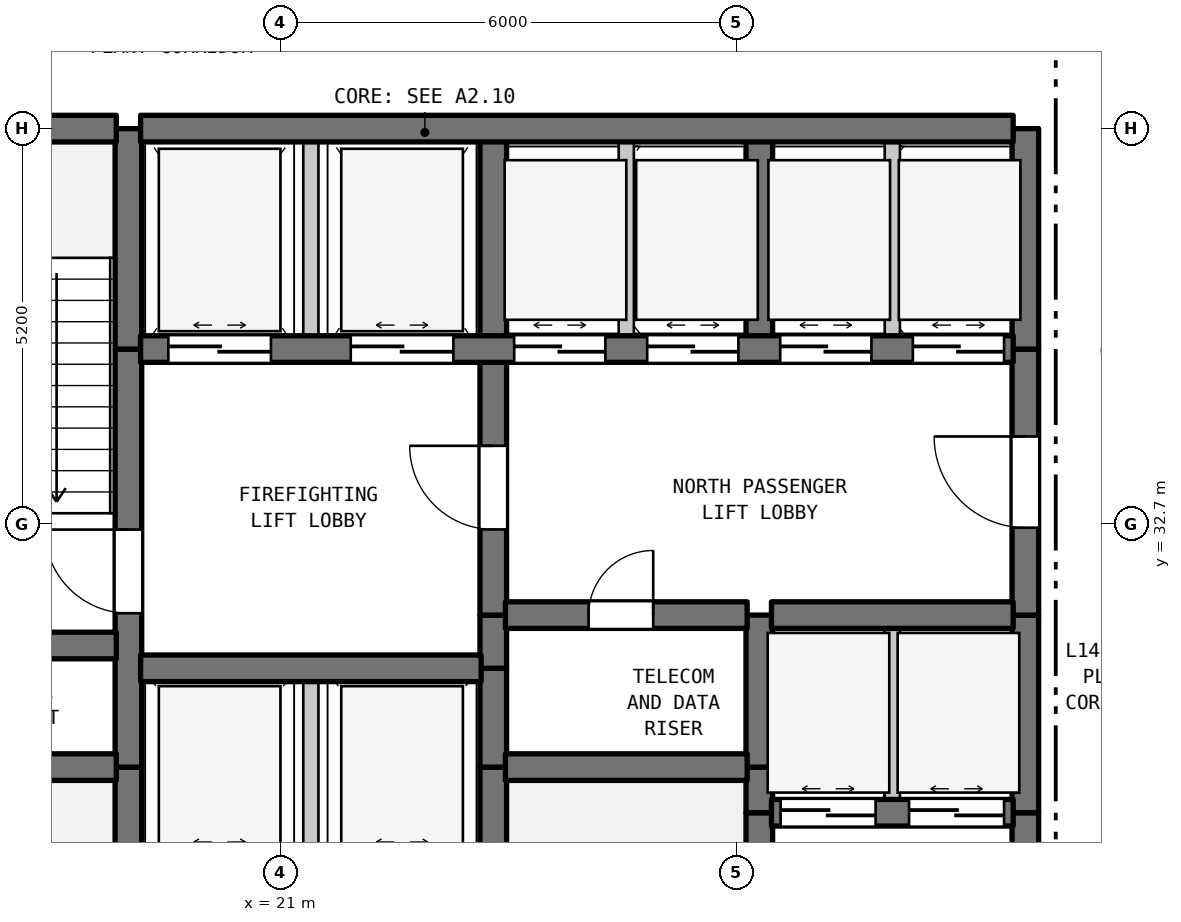
"""IFC4 building model, lengths in metres.
Left out: names, types, materials, properties, quantities, classifications, styles, units other than length and angle.
Written with IfcOpenShell. Run it as: python <this file> out.ifc"""

import sys

from ifc_helpers import new_model, si_unit, direction, frame, frame_2d, origin, place, context, subcontext, project, spatial, rectangle, extrude, element, fill, save


model = new_model("IFC4")
c1 = context("Model", 3, precision=1e-05, world=origin(), true_north=direction((0.0, 1.0)))
c2 = subcontext(c1, "Body", "Model", "MODEL_VIEW")
j1 = project(units=[si_unit("LENGTHUNIT", "METRE"), si_unit("PLANEANGLEUNIT", "RADIAN")], contexts=[c1])
p1 = place(None, origin())
s1 = spatial("IfcSite", under=j1, at=p1, CompositionType="ELEMENT")
p2 = place(p1, origin())
s2 = spatial("IfcBuilding", under=s1, at=p2, CompositionType="ELEMENT")
p3 = place(p2, frame((0.0, 0.0, 61.0)))
s3 = spatial("IfcBuildingStorey", under=s2, at=p3, CompositionType="ELEMENT", Elevation=61.0)
p4 = place(p3, frame((19.0, 28.2, 0.0), z_axis=(0.0, 0.0, 1.0), x_axis=(0.0, 1.0, 0.0)))
e1 = element("IfcWall", 1, at=p4, inside=s3, PredefinedType="SHEAR", context=c2, shape_type="SweptSolid", body=[
    extrude(rectangle(XDim=1.3, YDim=0.35, at=frame_2d((0.65, 0.0))), origin(), (0.0, 0.0, 1.0), 4.28),
])
p5 = place(p3, frame((19.0, 29.5, 0.0), z_axis=(0.0, 0.0, 1.0), x_axis=(0.0, 1.0, 0.0)))
e2 = element("IfcWall", 2, at=p5, inside=s3, PredefinedType="SHEAR", context=c2, shape_type="SweptSolid", body=[
    extrude(rectangle(XDim=5.5, YDim=0.35, at=frame_2d((2.75, 0.0))), origin(), (0.0, 0.0, 1.0), 4.28),
])
p6 = place(p5, frame((2.025, 0.0, 0.0)))
e3 = element("IfcOpeningElement", 3, at=p6, cuts=e2, PredefinedType="OPENING", context=c2, shape_type="SweptSolid", body=[
    extrude(rectangle(XDim=1.1, YDim=2.15, at=frame_2d((0.55, 1.075))), frame((0.0, 0.185, 0.0), z_axis=(0.0, -1.0, 0.0), x_axis=(1.0, 0.0, 0.0)), (0.0, 0.0, 1.0), 0.37),
])
p7 = place(p3, frame((19.0, 35.0, 0.0), z_axis=(0.0, 0.0, 1.0), x_axis=(0.0, 1.0, 0.0)))
e4 = element("IfcWall", 4, at=p7, inside=s3, PredefinedType="SHEAR", context=c2, shape_type="SweptSolid", body=[
    extrude(rectangle(XDim=2.9, YDim=0.35, at=frame_2d((1.45, 0.0))), origin(), (0.0, 0.0, 1.0), 4.28),
])
p8 = place(p3, frame((21.4, 28.2, 0.0), z_axis=(0.0, 0.0, 1.0), x_axis=(0.0, 1.0, 0.0)))
e5 = element("IfcWall", 5, at=p8, inside=s3, PredefinedType="STANDARD", context=c2, shape_type="SweptSolid", body=[
    extrude(rectangle(XDim=2.6, YDim=0.2, at=frame_2d((1.3, 0.0))), origin(), (0.0, 0.0, 1.0), 4.28),
])
p9 = place(p3, frame((21.4, 35.0, 0.0), z_axis=(0.0, 0.0, 1.0), x_axis=(0.0, 1.0, 0.0)))
e6 = element("IfcWall", 6, at=p9, inside=s3, PredefinedType="STANDARD", context=c2, shape_type="SweptSolid", body=[
    extrude(rectangle(XDim=2.9, YDim=0.2, at=frame_2d((1.45, 0.0))), origin(), (0.0, 0.0, 1.0), 4.28),
])
for number, where, z_axis, x_axis in (
    (7, (23.8, 28.2, 0.0), (0.0, 0.0, 1.0), (0.0, 1.0, 0.0)),
    (8, (23.8, 29.5, 0.0), (0.0, 0.0, 1.0), (0.0, 1.0, 0.0)),
):
    element("IfcWall", number, at=place(p3, frame(where, z_axis=z_axis, x_axis=x_axis)), inside=s3, PredefinedType="SHEAR", context=c2, shape_type="SweptSolid", body=[
        extrude(rectangle(XDim=1.3, YDim=0.35, at=frame_2d((0.65, 0.0))), origin(), (0.0, 0.0, 1.0), 4.28),
    ])
p10 = place(p3, frame((23.8, 30.8, 0.0), z_axis=(0.0, 0.0, 1.0), x_axis=(0.0, 1.0, 0.0)))
e9 = element("IfcWall", 9, at=p10, inside=s3, PredefinedType="SHEAR", context=c2, shape_type="SweptSolid", body=[
    extrude(rectangle(XDim=0.7, YDim=0.35, at=frame_2d((0.35, 0.0))), origin(), (0.0, 0.0, 1.0), 4.28),
])
p11 = place(p3, frame((23.8, 31.5, 0.0), z_axis=(0.0, 0.0, 1.0), x_axis=(0.0, 1.0, 0.0)))
e10 = element("IfcWall", 10, at=p11, inside=s3, PredefinedType="SHEAR", context=c2, shape_type="SweptSolid", body=[
    extrude(rectangle(XDim=3.5, YDim=0.35, at=frame_2d((1.75, 0.0))), origin(), (0.0, 0.0, 1.0), 4.28),
])
p12 = place(p11, frame((1.127, 0.0, 0.0)))
e11 = element("IfcOpeningElement", 11, at=p12, cuts=e10, PredefinedType="OPENING", context=c2, shape_type="SweptSolid", body=[
    extrude(rectangle(XDim=1.1, YDim=2.15, at=frame_2d((0.55, 1.075))), frame((0.0, 0.185, 0.0), z_axis=(0.0, -1.0, 0.0), x_axis=(1.0, 0.0, 0.0)), (0.0, 0.0, 1.0), 0.37),
])
p13 = place(p3, frame((23.8, 35.0, 0.0), z_axis=(0.0, 0.0, 1.0), x_axis=(0.0, 1.0, 0.0)))
e12 = element("IfcWall", 12, at=p13, inside=s3, PredefinedType="SHEAR", context=c2, shape_type="SweptSolid", body=[
    extrude(rectangle(XDim=2.9, YDim=0.35, at=frame_2d((1.45, 0.0))), origin(), (0.0, 0.0, 1.0), 4.28),
])
p14 = place(p3, frame((25.55, 35.0, 0.0), z_axis=(0.0, 0.0, 1.0), x_axis=(0.0, 1.0, 0.0)))
e13 = element("IfcWall", 13, at=p14, inside=s3, PredefinedType="STANDARD", context=c2, shape_type="SweptSolid", body=[
    extrude(rectangle(XDim=2.9, YDim=0.2, at=frame_2d((1.45, 0.0))), origin(), (0.0, 0.0, 1.0), 4.28),
])
p15 = place(p3, frame((27.3, 25.6, 0.0), z_axis=(0.0, 0.0, 1.0), x_axis=(0.0, 1.0, 0.0)))
e14 = element("IfcWall", 14, at=p15, inside=s3, PredefinedType="SHEAR", context=c2, shape_type="SweptSolid", body=[
    extrude(rectangle(XDim=3.3, YDim=0.35, at=frame_2d((1.65, 0.0))), origin(), (0.0, 0.0, 1.0), 4.28),
])
p16 = place(p3, frame((27.3, 28.9, 0.0), z_axis=(0.0, 0.0, 1.0), x_axis=(0.0, 1.0, 0.0)))
e15 = element("IfcWall", 15, at=p16, inside=s3, PredefinedType="SHEAR", context=c2, shape_type="SweptSolid", body=[
    extrude(rectangle(XDim=0.6, YDim=0.35, at=frame_2d((0.3, 0.0))), origin(), (0.0, 0.0, 1.0), 4.28),
])
p17 = place(p3, frame((27.3, 29.5, 0.0), z_axis=(0.0, 0.0, 1.0), x_axis=(0.0, 1.0, 0.0)))
e16 = element("IfcWall", 16, at=p17, inside=s3, PredefinedType="SHEAR", context=c2, shape_type="SweptSolid", body=[
    extrude(rectangle(XDim=2.0, YDim=0.35, at=frame_2d((1.0, 0.0))), origin(), (0.0, 0.0, 1.0), 4.28),
])
p18 = place(p3, frame((27.3, 35.0, 0.0), z_axis=(0.0, 0.0, 1.0), x_axis=(0.0, 1.0, 0.0)))
e17 = element("IfcWall", 17, at=p18, inside=s3, PredefinedType="SHEAR", context=c2, shape_type="SweptSolid", body=[
    extrude(rectangle(XDim=2.9, YDim=0.35, at=frame_2d((1.45, 0.0))), origin(), (0.0, 0.0, 1.0), 4.28),
])
p19 = place(p3, frame((29.05, 28.9, 0.0), z_axis=(0.0, 0.0, 1.0), x_axis=(0.0, 1.0, 0.0)))
e18 = element("IfcWall", 18, at=p19, inside=s3, PredefinedType="STANDARD", context=c2, shape_type="SweptSolid", body=[
    extrude(rectangle(XDim=2.6, YDim=0.2, at=frame_2d((1.3, 0.0))), origin(), (0.0, 0.0, 1.0), 4.28),
])
p20 = place(p3, frame((29.05, 35.0, 0.0), z_axis=(0.0, 0.0, 1.0), x_axis=(0.0, 1.0, 0.0)))
e19 = element("IfcWall", 19, at=p20, inside=s3, PredefinedType="STANDARD", context=c2, shape_type="SweptSolid", body=[
    extrude(rectangle(XDim=2.9, YDim=0.2, at=frame_2d((1.45, 0.0))), origin(), (0.0, 0.0, 1.0), 4.28),
])
p21 = place(p3, frame((30.8, 25.6, 0.0), z_axis=(0.0, 0.0, 1.0), x_axis=(0.0, 1.0, 0.0)))
e20 = element("IfcWall", 20, at=p21, inside=s3, PredefinedType="SHEAR", context=c2, shape_type="SweptSolid", body=[
    extrude(rectangle(XDim=3.3, YDim=0.35, at=frame_2d((1.65, 0.0))), origin(), (0.0, 0.0, 1.0), 4.28),
])
p22 = place(p21, frame((0.253, 0.0, 0.0)))
e21 = element("IfcOpeningElement", 21, at=p22, cuts=e20, PredefinedType="OPENING", context=c2, shape_type="SweptSolid", body=[
    extrude(rectangle(XDim=1.2, YDim=2.2, at=frame_2d((0.6, 1.1))), frame((0.0, 0.185, 0.0), z_axis=(0.0, -1.0, 0.0), x_axis=(1.0, 0.0, 0.0)), (0.0, 0.0, 1.0), 0.37),
])
p23 = place(p3, frame((30.8, 28.9, 0.0), z_axis=(0.0, 0.0, 1.0), x_axis=(0.0, 1.0, 0.0)))
e22 = element("IfcWall", 22, at=p23, inside=s3, PredefinedType="SHEAR", context=c2, shape_type="SweptSolid", body=[
    extrude(rectangle(XDim=2.6, YDim=0.35, at=frame_2d((1.3, 0.0))), origin(), (0.0, 0.0, 1.0), 4.28),
])
p24 = place(p3, frame((30.8, 31.5, 0.0), z_axis=(0.0, 0.0, 1.0), x_axis=(0.0, 1.0, 0.0)))
e23 = element("IfcWall", 23, at=p24, inside=s3, PredefinedType="SHEAR", context=c2, shape_type="SweptSolid", body=[
    extrude(rectangle(XDim=3.5, YDim=0.35, at=frame_2d((1.75, 0.0))), origin(), (0.0, 0.0, 1.0), 4.28),
])
p25 = place(p24, frame((1.15, 0.0, 0.0)))
e24 = element("IfcOpeningElement", 24, at=p25, cuts=e23, PredefinedType="OPENING", context=c2, shape_type="SweptSolid", body=[
    extrude(rectangle(XDim=1.2, YDim=2.2, at=frame_2d((0.6, 1.1))), frame((0.0, 0.185, 0.0), z_axis=(0.0, -1.0, 0.0), x_axis=(1.0, 0.0, 0.0)), (0.0, 0.0, 1.0), 0.37),
])
p26 = place(p3, frame((30.8, 35.0, 0.0), z_axis=(0.0, 0.0, 1.0), x_axis=(0.0, 1.0, 0.0)))
e25 = element("IfcWall", 25, at=p26, inside=s3, PredefinedType="SHEAR", context=c2, shape_type="SweptSolid", body=[
    extrude(rectangle(XDim=2.9, YDim=0.35, at=frame_2d((1.45, 0.0))), origin(), (0.0, 0.0, 1.0), 4.28),
])
p27 = place(p3, frame((27.46, 28.9, 0.0), z_axis=(0.0, 0.0, 1.0), x_axis=(1.0, 0.0, 0.0)))
e26 = element("IfcWall", 26, at=p27, inside=s3, PredefinedType="SHEAR", context=c2, shape_type="SweptSolid", body=[
    extrude(rectangle(XDim=3.18, YDim=0.35, at=frame_2d((1.59, 0.0))), origin(), (0.0, 0.0, 1.0), 4.28),
])
p28 = place(p27, frame((0.12, 0.0, 0.0)))
e27 = element("IfcOpeningElement", 27, at=p28, cuts=e26, PredefinedType="OPENING", context=c2, shape_type="SweptSolid", body=[
    extrude(rectangle(XDim=1.25, YDim=2.2, at=frame_2d((0.625, 1.1))), frame((0.0, 0.185, 0.0), z_axis=(0.0, -1.0, 0.0), x_axis=(1.0, 0.0, 0.0)), (0.0, 0.0, 1.0), 0.37),
])
p29 = place(p27, frame((1.81, 0.0, 0.0)))
e28 = element("IfcOpeningElement", 28, at=p29, cuts=e26, PredefinedType="OPENING", context=c2, shape_type="SweptSolid", body=[
    extrude(rectangle(XDim=1.25, YDim=2.2, at=frame_2d((0.625, 1.1))), frame((0.0, 0.185, 0.0), z_axis=(0.0, -1.0, 0.0), x_axis=(1.0, 0.0, 0.0)), (0.0, 0.0, 1.0), 0.37),
])
p30 = place(p3, frame((15.16, 29.5, 0.0), z_axis=(0.0, 0.0, 1.0), x_axis=(1.0, 0.0, 0.0)))
e29 = element("IfcWall", 29, at=p30, inside=s3, PredefinedType="SHEAR", context=c2, shape_type="SweptSolid", body=[
    extrude(rectangle(XDim=3.68, YDim=0.35, at=frame_2d((1.84, 0.0))), origin(), (0.0, 0.0, 1.0), 4.28),
])
p31 = place(p3, frame((23.96, 29.5, 0.0), z_axis=(0.0, 0.0, 1.0), x_axis=(1.0, 0.0, 0.0)))
e30 = element("IfcWall", 30, at=p31, inside=s3, PredefinedType="SHEAR", context=c2, shape_type="SweptSolid", body=[
    extrude(rectangle(XDim=3.18, YDim=0.35, at=frame_2d((1.59, 0.0))), origin(), (0.0, 0.0, 1.0), 4.28),
])
p32 = place(p3, frame((19.16, 30.8, 0.0), z_axis=(0.0, 0.0, 1.0), x_axis=(1.0, 0.0, 0.0)))
e31 = element("IfcWall", 31, at=p32, inside=s3, PredefinedType="SHEAR", context=c2, shape_type="SweptSolid", body=[
    extrude(rectangle(XDim=4.48, YDim=0.35, at=frame_2d((2.24, 0.0))), origin(), (0.0, 0.0, 1.0), 4.28),
])
p33 = place(p3, frame((15.16, 31.1, 0.0), z_axis=(0.0, 0.0, 1.0), x_axis=(1.0, 0.0, 0.0)))
e32 = element("IfcWall", 32, at=p33, inside=s3, PredefinedType="SHEAR", context=c2, shape_type="SweptSolid", body=[
    extrude(rectangle(XDim=3.68, YDim=0.35, at=frame_2d((1.84, 0.0))), origin(), (0.0, 0.0, 1.0), 4.28),
])
p34 = place(p3, frame((23.96, 31.5, 0.0), z_axis=(0.0, 0.0, 1.0), x_axis=(1.0, 0.0, 0.0)))
e33 = element("IfcWall", 33, at=p34, inside=s3, PredefinedType="SHEAR", context=c2, shape_type="SweptSolid", body=[
    extrude(rectangle(XDim=3.18, YDim=0.35, at=frame_2d((1.59, 0.0))), origin(), (0.0, 0.0, 1.0), 4.28),
])
p35 = place(p34, frame((1.094, 0.0, 0.0)))
e34 = element("IfcOpeningElement", 34, at=p35, cuts=e33, PredefinedType="OPENING", context=c2, shape_type="SweptSolid", body=[
    extrude(rectangle(XDim=0.85, YDim=2.1, at=frame_2d((0.425, 1.05))), frame((0.0, 0.185, 0.0), z_axis=(0.0, -1.0, 0.0), x_axis=(1.0, 0.0, 0.0)), (0.0, 0.0, 1.0), 0.37),
])
p36 = place(p3, frame((27.46, 31.5, 0.0), z_axis=(0.0, 0.0, 1.0), x_axis=(1.0, 0.0, 0.0)))
e35 = element("IfcWall", 35, at=p36, inside=s3, PredefinedType="SHEAR", context=c2, shape_type="SweptSolid", body=[
    extrude(rectangle(XDim=3.18, YDim=0.35, at=frame_2d((1.59, 0.0))), origin(), (0.0, 0.0, 1.0), 4.28),
])
p37 = place(p3, frame((19.16, 35.0, 0.0), z_axis=(0.0, 0.0, 1.0), x_axis=(1.0, 0.0, 0.0)))
e36 = element("IfcWall", 36, at=p37, inside=s3, PredefinedType="SHEAR", context=c2, shape_type="SweptSolid", body=[
    extrude(rectangle(XDim=11.48, YDim=0.35, at=frame_2d((5.74, 0.0))), origin(), (0.0, 0.0, 1.0), 4.28),
])
p38 = place(p37, frame((0.365, 0.0, 0.0)))
e37 = element("IfcOpeningElement", 37, at=p38, cuts=e36, PredefinedType="OPENING", context=c2, shape_type="SweptSolid", body=[
    extrude(rectangle(XDim=1.35, YDim=2.2, at=frame_2d((0.675, 1.1))), frame((0.0, 0.185, 0.0), z_axis=(0.0, -1.0, 0.0), x_axis=(1.0, 0.0, 0.0)), (0.0, 0.0, 1.0), 0.37),
])
p39 = place(p37, frame((2.765, 0.0, 0.0)))
e38 = element("IfcOpeningElement", 38, at=p39, cuts=e36, PredefinedType="OPENING", context=c2, shape_type="SweptSolid", body=[
    extrude(rectangle(XDim=1.35, YDim=2.2, at=frame_2d((0.675, 1.1))), frame((0.0, 0.185, 0.0), z_axis=(0.0, -1.0, 0.0), x_axis=(1.0, 0.0, 0.0)), (0.0, 0.0, 1.0), 0.37),
])
p40 = place(p37, frame((4.915, 0.0, 0.0)))
e39 = element("IfcOpeningElement", 39, at=p40, cuts=e36, PredefinedType="OPENING", context=c2, shape_type="SweptSolid", body=[
    extrude(rectangle(XDim=1.2, YDim=2.2, at=frame_2d((0.6, 1.1))), frame((0.0, 0.185, 0.0), z_axis=(0.0, -1.0, 0.0), x_axis=(1.0, 0.0, 0.0)), (0.0, 0.0, 1.0), 0.37),
])
p41 = place(p37, frame((6.665, 0.0, 0.0)))
e40 = element("IfcOpeningElement", 40, at=p41, cuts=e36, PredefinedType="OPENING", context=c2, shape_type="SweptSolid", body=[
    extrude(rectangle(XDim=1.2, YDim=2.2, at=frame_2d((0.6, 1.1))), frame((0.0, 0.185, 0.0), z_axis=(0.0, -1.0, 0.0), x_axis=(1.0, 0.0, 0.0)), (0.0, 0.0, 1.0), 0.37),
])
p42 = place(p37, frame((8.415, 0.0, 0.0)))
e41 = element("IfcOpeningElement", 41, at=p42, cuts=e36, PredefinedType="OPENING", context=c2, shape_type="SweptSolid", body=[
    extrude(rectangle(XDim=1.2, YDim=2.2, at=frame_2d((0.6, 1.1))), frame((0.0, 0.185, 0.0), z_axis=(0.0, -1.0, 0.0), x_axis=(1.0, 0.0, 0.0)), (0.0, 0.0, 1.0), 0.37),
])
p43 = place(p37, frame((10.16, 0.0, 0.0)))
e42 = element("IfcOpeningElement", 42, at=p43, cuts=e36, PredefinedType="OPENING", context=c2, shape_type="SweptSolid", body=[
    extrude(rectangle(XDim=1.2, YDim=2.2, at=frame_2d((0.6, 1.1))), frame((0.0, 0.185, 0.0), z_axis=(0.0, -1.0, 0.0), x_axis=(1.0, 0.0, 0.0)), (0.0, 0.0, 1.0), 0.37),
])
p44 = place(p3, frame((15.16, 37.9, 0.0), z_axis=(0.0, 0.0, 1.0), x_axis=(1.0, 0.0, 0.0)))
e43 = element("IfcWall", 43, at=p44, inside=s3, PredefinedType="SHEAR", context=c2, shape_type="SweptSolid", body=[
    extrude(rectangle(XDim=3.68, YDim=0.35, at=frame_2d((1.84, 0.0))), origin(), (0.0, 0.0, 1.0), 4.28),
])
p45 = place(p3, frame((19.16, 37.9, 0.0), z_axis=(0.0, 0.0, 1.0), x_axis=(1.0, 0.0, 0.0)))
e44 = element("IfcWall", 44, at=p45, inside=s3, PredefinedType="SHEAR", context=c2, shape_type="SweptSolid", body=[
    extrude(rectangle(XDim=11.48, YDim=0.35, at=frame_2d((5.74, 0.0))), origin(), (0.0, 0.0, 1.0), 4.28),
])
p46 = place(p6, origin())
e45 = element("IfcDoor", 45, at=p46, inside=s3, OperationType="SINGLE_SWING_RIGHT", PredefinedType="DOOR", context=c2, shape_type="SweptSolid", body=[
    extrude(rectangle(XDim=1.1, YDim=2.15, at=frame_2d((0.55, 1.075))), frame((0.0, 0.025, 0.0), z_axis=(0.0, -1.0, 0.0), x_axis=(1.0, 0.0, 0.0)), (0.0, 0.0, 1.0), 0.05),
])
fill(e3, e45)
p47 = place(p12, origin())
e46 = element("IfcDoor", 46, at=p47, inside=s3, OperationType="SINGLE_SWING_RIGHT", PredefinedType="DOOR", context=c2, shape_type="SweptSolid", body=[
    extrude(rectangle(XDim=1.1, YDim=2.15, at=frame_2d((0.55, 1.075))), frame((0.0, 0.025, 0.0), z_axis=(0.0, -1.0, 0.0), x_axis=(1.0, 0.0, 0.0)), (0.0, 0.0, 1.0), 0.05),
])
fill(e11, e46)
p48 = place(p25, origin())
e47 = element("IfcDoor", 47, at=p48, inside=s3, OperationType="SINGLE_SWING_RIGHT", PredefinedType="DOOR", context=c2, shape_type="SweptSolid", body=[
    extrude(rectangle(XDim=1.2, YDim=2.2, at=frame_2d((0.6, 1.1))), frame((0.0, 0.025, 0.0), z_axis=(0.0, -1.0, 0.0), x_axis=(1.0, 0.0, 0.0)), (0.0, 0.0, 1.0), 0.05),
])
fill(e24, e47)
p49 = place(p28, origin())
e48 = element("IfcDoor", 48, at=p49, inside=s3, OperationType="DOUBLE_DOOR_SLIDING", PredefinedType="DOOR", context=c2, shape_type="SweptSolid", body=[
    extrude(rectangle(XDim=1.25, YDim=2.2, at=frame_2d((0.625, 1.1))), frame((0.0, 0.025, 0.0), z_axis=(0.0, -1.0, 0.0), x_axis=(1.0, 0.0, 0.0)), (0.0, 0.0, 1.0), 0.05),
])
fill(e27, e48)
p50 = place(p29, origin())
e49 = element("IfcDoor", 49, at=p50, inside=s3, OperationType="DOUBLE_DOOR_SLIDING", PredefinedType="DOOR", context=c2, shape_type="SweptSolid", body=[
    extrude(rectangle(XDim=1.25, YDim=2.2, at=frame_2d((0.625, 1.1))), frame((0.0, 0.025, 0.0), z_axis=(0.0, -1.0, 0.0), x_axis=(1.0, 0.0, 0.0)), (0.0, 0.0, 1.0), 0.05),
])
fill(e28, e49)
p51 = place(p35, origin())
e50 = element("IfcDoor", 50, at=p51, inside=s3, OperationType="SINGLE_SWING_RIGHT", PredefinedType="DOOR", context=c2, shape_type="SweptSolid", body=[
    extrude(rectangle(XDim=0.85, YDim=2.1, at=frame_2d((0.425, 1.05))), frame((0.0, 0.025, 0.0), z_axis=(0.0, -1.0, 0.0), x_axis=(1.0, 0.0, 0.0)), (0.0, 0.0, 1.0), 0.05),
])
fill(e34, e50)
p52 = place(p38, origin())
e51 = element("IfcDoor", 51, at=p52, inside=s3, OperationType="DOUBLE_DOOR_SLIDING", PredefinedType="DOOR", context=c2, shape_type="SweptSolid", body=[
    extrude(rectangle(XDim=1.35, YDim=2.2, at=frame_2d((0.675, 1.1))), frame((0.0, 0.025, 0.0), z_axis=(0.0, -1.0, 0.0), x_axis=(1.0, 0.0, 0.0)), (0.0, 0.0, 1.0), 0.05),
])
fill(e37, e51)
p53 = place(p39, origin())
e52 = element("IfcDoor", 52, at=p53, inside=s3, OperationType="DOUBLE_DOOR_SLIDING", PredefinedType="DOOR", context=c2, shape_type="SweptSolid", body=[
    extrude(rectangle(XDim=1.35, YDim=2.2, at=frame_2d((0.675, 1.1))), frame((0.0, 0.025, 0.0), z_axis=(0.0, -1.0, 0.0), x_axis=(1.0, 0.0, 0.0)), (0.0, 0.0, 1.0), 0.05),
])
fill(e38, e52)
p54 = place(p40, origin())
e53 = element("IfcDoor", 53, at=p54, inside=s3, OperationType="DOUBLE_DOOR_SLIDING", PredefinedType="DOOR", context=c2, shape_type="SweptSolid", body=[
    extrude(rectangle(XDim=1.2, YDim=2.2, at=frame_2d((0.6, 1.1))), frame((0.0, 0.025, 0.0), z_axis=(0.0, -1.0, 0.0), x_axis=(1.0, 0.0, 0.0)), (0.0, 0.0, 1.0), 0.05),
])
fill(e39, e53)
p55 = place(p41, origin())
e54 = element("IfcDoor", 54, at=p55, inside=s3, OperationType="DOUBLE_DOOR_SLIDING", PredefinedType="DOOR", context=c2, shape_type="SweptSolid", body=[
    extrude(rectangle(XDim=1.2, YDim=2.2, at=frame_2d((0.6, 1.1))), frame((0.0, 0.025, 0.0), z_axis=(0.0, -1.0, 0.0), x_axis=(1.0, 0.0, 0.0)), (0.0, 0.0, 1.0), 0.05),
])
fill(e40, e54)
p56 = place(p42, origin())
e55 = element("IfcDoor", 55, at=p56, inside=s3, OperationType="DOUBLE_DOOR_SLIDING", PredefinedType="DOOR", context=c2, shape_type="SweptSolid", body=[
    extrude(rectangle(XDim=1.2, YDim=2.2, at=frame_2d((0.6, 1.1))), frame((0.0, 0.025, 0.0), z_axis=(0.0, -1.0, 0.0), x_axis=(1.0, 0.0, 0.0)), (0.0, 0.0, 1.0), 0.05),
])
fill(e41, e55)
p57 = place(p43, origin())
e56 = element("IfcDoor", 56, at=p57, inside=s3, OperationType="DOUBLE_DOOR_SLIDING", PredefinedType="DOOR", context=c2, shape_type="SweptSolid", body=[
    extrude(rectangle(XDim=1.2, YDim=2.2, at=frame_2d((0.6, 1.1))), frame((0.0, 0.025, 0.0), z_axis=(0.0, -1.0, 0.0), x_axis=(1.0, 0.0, 0.0)), (0.0, 0.0, 1.0), 0.05),
])
fill(e42, e56)
save(model, sys.argv[1])
